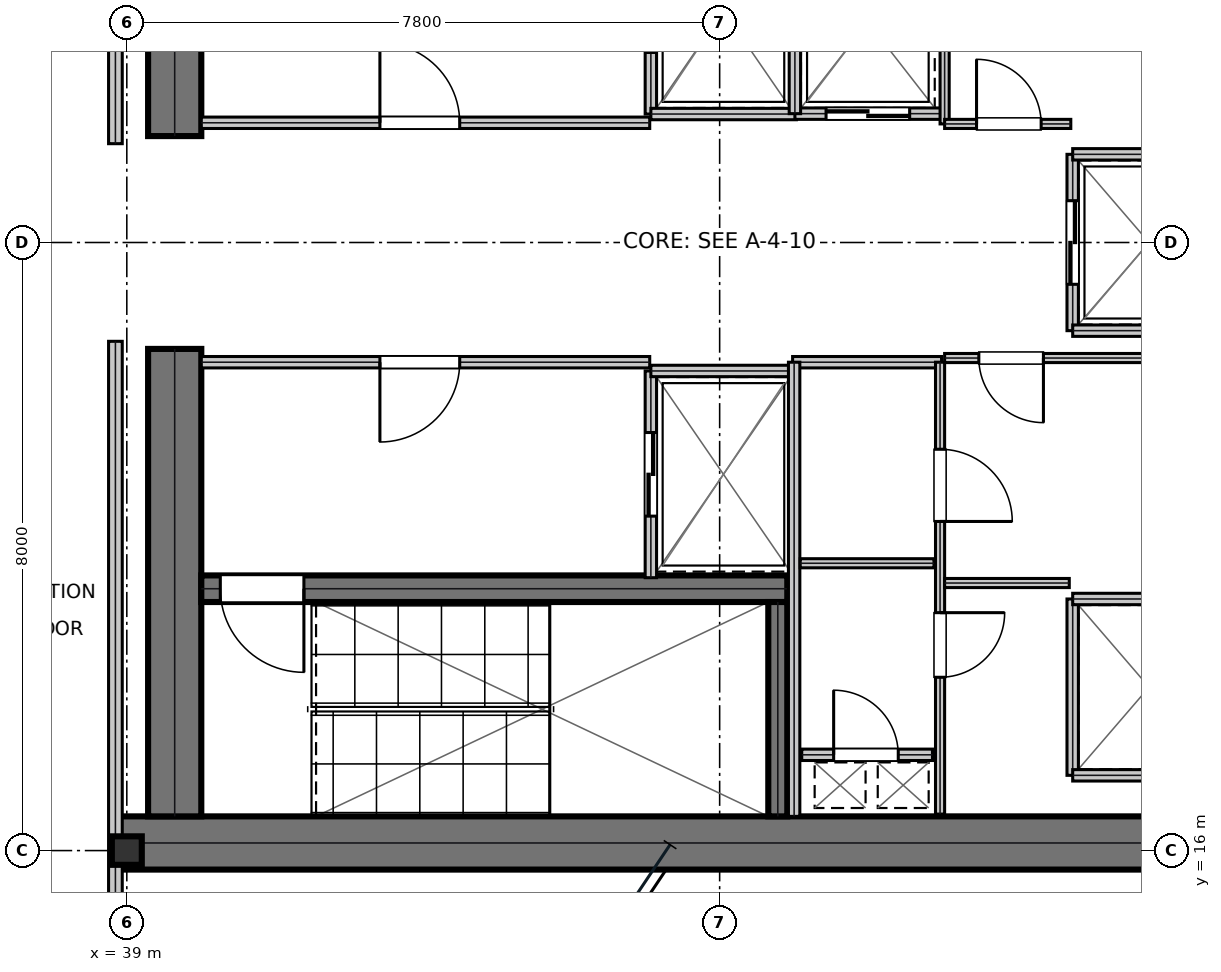
"""IFC4 building model, lengths in metres.
Left out: names, types, materials, properties, quantities, classifications, styles, units other than length and angle.
Written with IfcOpenShell. Run it as: python <this file> out.ifc"""

import sys

from ifc_helpers import new_model, si_unit, direction, frame, frame_2d, origin, origin_2d, place, context, subcontext, project, spatial, rectangle, i_section, extrude, element, fill, save


model = new_model("IFC4")
c1 = context("Model", 3, precision=1e-05, world=origin(), true_north=direction((0.0, 1.0)))
c2 = subcontext(c1, "Body", "Model", "MODEL_VIEW")
j1 = project(units=[si_unit("LENGTHUNIT", "METRE"), si_unit("PLANEANGLEUNIT", "RADIAN")], contexts=[c1])
p1 = place(None, origin())
s1 = spatial("IfcSite", under=j1, at=p1, CompositionType="ELEMENT")
p2 = place(p1, origin())
s2 = spatial("IfcBuilding", under=s1, at=p2, CompositionType="ELEMENT")
p3 = place(p2, frame((0.0, 0.0, 204.0)))
s3 = spatial("IfcBuildingStorey", under=s2, at=p3, CompositionType="ELEMENT", Elevation=204.0)
p4 = place(p3, frame((38.8, 16.1, 0.0), z_axis=(0.0, 0.0, 1.0), x_axis=(1.0, 0.0, 0.0)))
e1 = element("IfcWall", 1, at=p4, inside=s3, PredefinedType="SHEAR", context=c2, shape_type="SweptSolid", body=[
    extrude(rectangle(XDim=16.0, YDim=0.7, at=frame_2d((8.0, 0.0))), origin(), (0.0, 0.0, 1.0), 3.79),
])
for number, where, z_axis, x_axis in (
    (2, (39.63, 16.45, 0.0), (0.0, 0.0, 1.0), (0.0, 1.0, 0.0)),
    (3, (39.63, 25.4, 0.0), (0.0, 0.0, 1.0), (0.0, 1.0, 0.0)),
):
    element("IfcWall", number, at=place(p3, frame(where, z_axis=z_axis, x_axis=x_axis)), inside=s3, PredefinedType="SHEAR", context=c2, shape_type="SweptSolid", body=[
        extrude(rectangle(XDim=6.15, YDim=0.7, at=frame_2d((3.075, 0.0))), origin(), (0.0, 0.0, 1.0), 3.79),
    ])
p5 = place(p3, frame((39.98, 19.445, 0.0), z_axis=(0.0, 0.0, 1.0), x_axis=(1.0, 0.0, 0.0)))
e4 = element("IfcWall", 4, at=p5, inside=s3, PredefinedType="SHEAR", context=c2, shape_type="SweptSolid", body=[
    extrude(rectangle(XDim=7.71, YDim=0.35, at=frame_2d((3.855, 0.0))), origin(), (0.0, 0.0, 1.0), 3.79),
])
p6 = place(p5, frame((0.25, 0.0, 0.0)))
e5 = element("IfcOpeningElement", 5, at=p6, cuts=e4, PredefinedType="OPENING", context=c2, shape_type="SweptSolid", body=[
    extrude(rectangle(XDim=1.1, YDim=2.15, at=frame_2d((0.55, 1.075))), frame((0.0, 0.185, 0.0), z_axis=(0.0, -1.0, 0.0), x_axis=(1.0, 0.0, 0.0)), (0.0, 0.0, 1.0), 0.37),
])
p7 = place(p3, frame((47.565, 16.45, 0.0), z_axis=(0.0, 0.0, 1.0), x_axis=(0.0, 1.0, 0.0)))
e6 = element("IfcWall", 6, at=p7, inside=s3, PredefinedType="SHEAR", context=c2, shape_type="SweptSolid", body=[
    extrude(rectangle(XDim=2.82, YDim=0.25, at=frame_2d((1.41, 0.0))), origin(), (0.0, 0.0, 1.0), 3.79),
])
p8 = place(p3, frame((39.0, 16.0, 0.0), z_axis=(0.0, 0.0, 1.0), x_axis=(1.0, 0.0, 0.0)))
e7 = element("IfcColumn", 7, at=p8, inside=s3, PredefinedType="COLUMN", context=c2, shape_type="SweptSolid", body=[
    extrude(i_section(OverallWidth=0.394, OverallDepth=0.375, WebThickness=0.017, FlangeThickness=0.028, at=origin_2d()), origin(), (0.0, 0.0, 1.0), 4.044),
])
p9 = place(p3, frame((39.98, 25.575, 0.0), z_axis=(0.0, 0.0, 1.0), x_axis=(1.0, 0.0, 0.0)))
e8 = element("IfcWall", 8, at=p9, inside=s3, PredefinedType="PARTITIONING", context=c2, shape_type="SweptSolid", body=[
    extrude(rectangle(XDim=5.9, YDim=0.15, at=frame_2d((2.95, 0.0))), origin(), (0.0, 0.0, 1.0), 3.79),
])
p10 = place(p9, frame((2.35, 0.0, 0.0)))
e9 = element("IfcOpeningElement", 9, at=p10, cuts=e8, PredefinedType="OPENING", context=c2, shape_type="SweptSolid", body=[
    extrude(rectangle(XDim=1.05, YDim=2.15, at=frame_2d((0.525, 1.075))), frame((0.0, 0.085, 0.0), z_axis=(0.0, -1.0, 0.0), x_axis=(1.0, 0.0, 0.0)), (0.0, 0.0, 1.0), 0.17),
])
p11 = place(p3, frame((39.98, 22.425, 0.0), z_axis=(0.0, 0.0, 1.0), x_axis=(1.0, 0.0, 0.0)))
e10 = element("IfcWall", 10, at=p11, inside=s3, PredefinedType="PARTITIONING", context=c2, shape_type="SweptSolid", body=[
    extrude(rectangle(XDim=5.9, YDim=0.15, at=frame_2d((2.95, 0.0))), origin(), (0.0, 0.0, 1.0), 3.79),
])
p12 = place(p11, frame((2.35, 0.0, 0.0)))
e11 = element("IfcOpeningElement", 11, at=p12, cuts=e10, PredefinedType="OPENING", context=c2, shape_type="SweptSolid", body=[
    extrude(rectangle(XDim=1.05, YDim=2.15, at=frame_2d((0.525, 1.075))), frame((0.0, 0.085, 0.0), z_axis=(0.0, -1.0, 0.0), x_axis=(1.0, 0.0, 0.0)), (0.0, 0.0, 1.0), 0.17),
])
p13 = place(p3, frame((45.895, 25.69, 0.0), z_axis=(0.0, 0.0, 1.0), x_axis=(0.0, 1.0, 0.0)))
e12 = element("IfcWall", 12, at=p13, inside=s3, PredefinedType="PARTITIONING", context=c2, shape_type="SweptSolid", body=[
    extrude(rectangle(XDim=2.72, YDim=0.15, at=frame_2d((1.36, 0.0))), origin(), (0.0, 0.0, 1.0), 3.79),
])
p14 = place(p13, frame((0.81, 0.0, 0.0)))
e13 = element("IfcOpeningElement", 13, at=p14, cuts=e12, PredefinedType="OPENING", context=c2, shape_type="SweptSolid", body=[
    extrude(rectangle(XDim=1.1, YDim=2.15, at=frame_2d((0.55, 1.075))), frame((0.0, 0.085, 0.0), z_axis=(0.0, -1.0, 0.0), x_axis=(1.0, 0.0, 0.0)), (0.0, 0.0, 1.0), 0.17),
])
p15 = place(p3, frame((45.895, 25.69, 0.0), z_axis=(0.0, 0.0, 1.0), x_axis=(1.0, 0.0, 0.0)))
e14 = element("IfcWall", 14, at=p15, inside=s3, PredefinedType="PARTITIONING", context=c2, shape_type="SweptSolid", body=[
    extrude(rectangle(XDim=1.915, YDim=0.15, at=frame_2d((0.958, 0.0))), origin(), (0.0, 0.0, 1.0), 3.79),
])
p16 = place(p3, frame((45.895, 19.59, 0.0), z_axis=(0.0, 0.0, 1.0), x_axis=(0.0, 1.0, 0.0)))
e15 = element("IfcWall", 15, at=p16, inside=s3, PredefinedType="PARTITIONING", context=c2, shape_type="SweptSolid", body=[
    extrude(rectangle(XDim=2.72, YDim=0.15, at=frame_2d((1.36, 0.0))), origin(), (0.0, 0.0, 1.0), 3.79),
])
p17 = place(p16, frame((0.81, 0.0, 0.0)))
e16 = element("IfcOpeningElement", 16, at=p17, cuts=e15, PredefinedType="OPENING", context=c2, shape_type="SweptSolid", body=[
    extrude(rectangle(XDim=1.1, YDim=2.15, at=frame_2d((0.55, 1.075))), frame((0.0, 0.085, 0.0), z_axis=(0.0, -1.0, 0.0), x_axis=(1.0, 0.0, 0.0)), (0.0, 0.0, 1.0), 0.17),
])
p18 = place(p3, frame((45.895, 22.31, 0.0), z_axis=(0.0, 0.0, 1.0), x_axis=(1.0, 0.0, 0.0)))
e17 = element("IfcWall", 17, at=p18, inside=s3, PredefinedType="PARTITIONING", context=c2, shape_type="SweptSolid", body=[
    extrude(rectangle(XDim=1.915, YDim=0.15, at=frame_2d((0.958, 0.0))), origin(), (0.0, 0.0, 1.0), 3.79),
])
p19 = place(p3, frame((47.79, 25.695, 0.0), z_axis=(0.0, 0.0, 1.0), x_axis=(1.0, 0.0, 0.0)))
e18 = element("IfcWall", 18, at=p19, inside=s3, PredefinedType="PARTITIONING", context=c2, shape_type="SweptSolid", body=[
    extrude(rectangle(XDim=1.92, YDim=0.15, at=frame_2d((0.96, 0.0))), origin(), (0.0, 0.0, 1.0), 3.79),
])
p20 = place(p19, frame((0.41, 0.0, 0.0)))
e19 = element("IfcOpeningElement", 19, at=p20, cuts=e18, PredefinedType="OPENING", context=c2, shape_type="SweptSolid", body=[
    extrude(rectangle(XDim=1.1, YDim=2.15, at=frame_2d((0.55, 1.075))), frame((0.0, 0.085, 0.0), z_axis=(0.0, -1.0, 0.0), x_axis=(1.0, 0.0, 0.0)), (0.0, 0.0, 1.0), 0.17),
])
p21 = place(p3, frame((47.79, 25.695, 0.0), z_axis=(0.0, 0.0, 1.0), x_axis=(0.0, 1.0, 0.0)))
e20 = element("IfcWall", 20, at=p21, inside=s3, PredefinedType="PARTITIONING", context=c2, shape_type="SweptSolid", body=[
    extrude(rectangle(XDim=2.415, YDim=0.15, at=frame_2d((1.208, 0.0))), origin(), (0.0, 0.0, 1.0), 3.79),
])
p22 = place(p3, frame((51.445, 22.84, 0.0), z_axis=(0.0, 0.0, 1.0), x_axis=(0.0, 1.0, 0.0)))
e21 = element("IfcWall", 21, at=p22, inside=s3, PredefinedType="PARTITIONING", context=c2, shape_type="SweptSolid", body=[
    extrude(rectangle(XDim=2.32, YDim=0.15, at=frame_2d((1.16, 0.0))), origin(), (0.0, 0.0, 1.0), 3.79),
])
p23 = place(p22, frame((0.61, 0.0, 0.0)))
e22 = element("IfcOpeningElement", 22, at=p23, cuts=e21, PredefinedType="OPENING", context=c2, shape_type="SweptSolid", body=[
    extrude(rectangle(XDim=1.1, YDim=2.15, at=frame_2d((0.55, 1.075))), frame((0.0, 0.085, 0.0), z_axis=(0.0, -1.0, 0.0), x_axis=(1.0, 0.0, 0.0)), (0.0, 0.0, 1.0), 0.17),
])
for number, where, z_axis, x_axis in (
    (23, (51.445, 22.84, 0.0), (0.0, 0.0, 1.0), (1.0, 0.0, 0.0)),
    (24, (51.445, 25.16, 0.0), (0.0, 0.0, 1.0), (1.0, 0.0, 0.0)),
):
    element("IfcWall", number, at=place(p3, frame(where, z_axis=z_axis, x_axis=x_axis)), inside=s3, PredefinedType="PARTITIONING", context=c2, shape_type="SweptSolid", body=[
        extrude(rectangle(XDim=2.015, YDim=0.15, at=frame_2d((1.007, 0.0))), origin(), (0.0, 0.0, 1.0), 3.79),
    ])
p24 = place(p3, frame((51.445, 16.99, 0.0), z_axis=(0.0, 0.0, 1.0), x_axis=(0.0, 1.0, 0.0)))
e25 = element("IfcWall", 25, at=p24, inside=s3, PredefinedType="PARTITIONING", context=c2, shape_type="SweptSolid", body=[
    extrude(rectangle(XDim=2.32, YDim=0.15, at=frame_2d((1.16, 0.0))), origin(), (0.0, 0.0, 1.0), 3.79),
])
for number, where, z_axis, x_axis in (
    (26, (51.445, 16.99, 0.0), (0.0, 0.0, 1.0), (1.0, 0.0, 0.0)),
    (27, (51.445, 19.31, 0.0), (0.0, 0.0, 1.0), (1.0, 0.0, 0.0)),
):
    element("IfcWall", number, at=place(p3, frame(where, z_axis=z_axis, x_axis=x_axis)), inside=s3, PredefinedType="PARTITIONING", context=c2, shape_type="SweptSolid", body=[
        extrude(rectangle(XDim=2.015, YDim=0.15, at=frame_2d((1.007, 0.0))), origin(), (0.0, 0.0, 1.0), 3.79),
    ])
p25 = place(p3, frame((47.88, 17.26, 0.0), z_axis=(0.0, 0.0, 1.0), x_axis=(1.0, 0.0, 0.0)))
e28 = element("IfcWall", 28, at=p25, inside=s3, PredefinedType="PARTITIONING", context=c2, shape_type="SweptSolid", body=[
    extrude(rectangle(XDim=1.72, YDim=0.15, at=frame_2d((0.86, 0.0))), origin(), (0.0, 0.0, 1.0), 3.79),
])
p26 = place(p25, frame((0.42, 0.0, 0.0)))
e29 = element("IfcOpeningElement", 29, at=p26, cuts=e28, PredefinedType="OPENING", context=c2, shape_type="SweptSolid", body=[
    extrude(rectangle(XDim=0.85, YDim=2.15, at=frame_2d((0.425, 1.075))), frame((0.0, 0.085, 0.0), z_axis=(0.0, -1.0, 0.0), x_axis=(1.0, 0.0, 0.0)), (0.0, 0.0, 1.0), 0.17),
])
p27 = place(p3, frame((47.76, 22.425, 0.0), z_axis=(0.0, 0.0, 1.0), x_axis=(1.0, 0.0, 0.0)))
e30 = element("IfcWall", 30, at=p27, inside=s3, PredefinedType="PARTITIONING", context=c2, shape_type="SweptSolid", body=[
    extrude(rectangle(XDim=1.96, YDim=0.15, at=frame_2d((0.98, 0.0))), origin(), (0.0, 0.0, 1.0), 3.79),
])
p28 = place(p3, frame((47.78, 16.45, 0.0), z_axis=(0.0, 0.0, 1.0), x_axis=(0.0, 1.0, 0.0)))
e31 = element("IfcWall", 31, at=p28, inside=s3, PredefinedType="PARTITIONING", context=c2, shape_type="SweptSolid", body=[
    extrude(rectangle(XDim=5.975, YDim=0.15, at=frame_2d((2.988, 0.0))), origin(), (0.0, 0.0, 1.0), 3.79),
])
p29 = place(p3, frame((47.86, 19.78, 0.0), z_axis=(0.0, 0.0, 1.0), x_axis=(1.0, 0.0, 0.0)))
e32 = element("IfcWall", 32, at=p29, inside=s3, PredefinedType="PARTITIONING", context=c2, shape_type="SweptSolid", body=[
    extrude(rectangle(XDim=1.76, YDim=0.12, at=frame_2d((0.88, 0.0))), origin(), (0.0, 0.0, 1.0), 3.79),
])
p30 = place(p3, frame((49.7, 16.48, 0.0), z_axis=(0.0, 0.0, 1.0), x_axis=(0.0, 1.0, 0.0)))
e33 = element("IfcWall", 33, at=p30, inside=s3, PredefinedType="PARTITIONING", context=c2, shape_type="SweptSolid", body=[
    extrude(rectangle(XDim=5.945, YDim=0.12, at=frame_2d((2.973, 0.0))), origin(), (0.0, 0.0, 1.0), 3.79),
])
p31 = place(p30, frame((1.8, 0.0, 0.0)))
e34 = element("IfcOpeningElement", 34, at=p31, cuts=e33, PredefinedType="OPENING", context=c2, shape_type="SweptSolid", body=[
    extrude(rectangle(XDim=0.85, YDim=2.15, at=frame_2d((0.425, 1.075))), frame((0.0, 0.07, 0.0), z_axis=(0.0, -1.0, 0.0), x_axis=(1.0, 0.0, 0.0)), (0.0, 0.0, 1.0), 0.14),
])
p32 = place(p30, frame((3.85, 0.0, 0.0)))
e35 = element("IfcOpeningElement", 35, at=p32, cuts=e33, PredefinedType="OPENING", context=c2, shape_type="SweptSolid", body=[
    extrude(rectangle(XDim=0.95, YDim=2.15, at=frame_2d((0.475, 1.075))), frame((0.0, 0.07, 0.0), z_axis=(0.0, -1.0, 0.0), x_axis=(1.0, 0.0, 0.0)), (0.0, 0.0, 1.0), 0.14),
])
p33 = place(p3, frame((49.76, 22.48, 0.0), z_axis=(0.0, 0.0, 1.0), x_axis=(1.0, 0.0, 0.0)))
e36 = element("IfcWall", 36, at=p33, inside=s3, PredefinedType="PARTITIONING", context=c2, shape_type="SweptSolid", body=[
    extrude(rectangle(XDim=3.9, YDim=0.12, at=frame_2d((1.95, 0.0))), origin(), (0.0, 0.0, 1.0), 3.79),
])
p34 = place(p33, frame((0.45, 0.0, 0.0)))
e37 = element("IfcOpeningElement", 37, at=p34, cuts=e36, PredefinedType="OPENING", context=c2, shape_type="SweptSolid", body=[
    extrude(rectangle(XDim=0.85, YDim=2.15, at=frame_2d((0.425, 1.075))), frame((0.0, 0.07, 0.0), z_axis=(0.0, -1.0, 0.0), x_axis=(1.0, 0.0, 0.0)), (0.0, 0.0, 1.0), 0.14),
])
p35 = place(p3, frame((49.76, 19.52, 0.0), z_axis=(0.0, 0.0, 1.0), x_axis=(1.0, 0.0, 0.0)))
e38 = element("IfcWall", 38, at=p35, inside=s3, PredefinedType="PARTITIONING", context=c2, shape_type="SweptSolid", body=[
    extrude(rectangle(XDim=1.64, YDim=0.12, at=frame_2d((0.82, 0.0))), origin(), (0.0, 0.0, 1.0), 3.79),
])
p36 = place(p3, frame((49.76, 25.56, 0.0), z_axis=(0.0, 0.0, 1.0), x_axis=(0.0, 1.0, 0.0)))
e39 = element("IfcWall", 39, at=p36, inside=s3, PredefinedType="PARTITIONING", context=c2, shape_type="SweptSolid", body=[
    extrude(rectangle(XDim=2.66, YDim=0.12, at=frame_2d((1.33, 0.0))), origin(), (0.0, 0.0, 1.0), 3.79),
])
p37 = place(p3, frame((49.76, 25.56, 0.0), z_axis=(0.0, 0.0, 1.0), x_axis=(1.0, 0.0, 0.0)))
e40 = element("IfcWall", 40, at=p37, inside=s3, PredefinedType="PARTITIONING", context=c2, shape_type="SweptSolid", body=[
    extrude(rectangle(XDim=1.66, YDim=0.12, at=frame_2d((0.83, 0.0))), origin(), (0.0, 0.0, 1.0), 3.79),
])
p38 = place(p37, frame((0.42, 0.0, 0.0)))
e41 = element("IfcOpeningElement", 41, at=p38, cuts=e40, PredefinedType="OPENING", context=c2, shape_type="SweptSolid", body=[
    extrude(rectangle(XDim=0.85, YDim=2.15, at=frame_2d((0.425, 1.075))), frame((0.0, 0.07, 0.0), z_axis=(0.0, -1.0, 0.0), x_axis=(1.0, 0.0, 0.0)), (0.0, 0.0, 1.0), 0.14),
])
p39 = place(p3, frame((38.85, 14.5, 0.0), z_axis=(0.0, 0.0, 1.0), x_axis=(0.0, 1.0, 0.0)))
e42 = element("IfcWall", 42, at=p39, inside=s3, PredefinedType="SOLIDWALL", context=c2, shape_type="SweptSolid", body=[
    extrude(rectangle(XDim=8.2, YDim=0.18, at=frame_2d((4.1, 0.0))), origin(), (0.0, 0.0, 1.0), 3.241),
])
p40 = place(p3, frame((38.85, 25.3, 0.0), z_axis=(0.0, 0.0, 1.0), x_axis=(0.0, 1.0, 0.0)))
e43 = element("IfcWall", 43, at=p40, inside=s3, PredefinedType="SOLIDWALL", context=c2, shape_type="SweptSolid", body=[
    extrude(rectangle(XDim=8.198, YDim=0.18, at=frame_2d((4.099, 0.0))), origin(), (0.0, 0.0, 1.0), 3.241),
])
p41 = place(p10, origin())
e44 = element("IfcDoor", 44, at=p41, inside=s3, OperationType="SINGLE_SWING_LEFT", PredefinedType="DOOR", context=c2, shape_type="SweptSolid", body=[
    extrude(rectangle(XDim=1.05, YDim=2.15, at=frame_2d((0.525, 1.075))), frame((0.0, 0.025, 0.0), z_axis=(0.0, -1.0, 0.0), x_axis=(1.0, 0.0, 0.0)), (0.0, 0.0, 1.0), 0.05),
])
fill(e9, e44)
p42 = place(p12, frame((1.05, 0.0, 0.0), z_axis=(0.0, 0.0, 1.0), x_axis=(-1.0, 0.0, 0.0)))
e45 = element("IfcDoor", 45, at=p42, inside=s3, OperationType="SINGLE_SWING_RIGHT", PredefinedType="DOOR", context=c2, shape_type="SweptSolid", body=[
    extrude(rectangle(XDim=1.05, YDim=2.15, at=frame_2d((0.525, 1.075))), frame((0.0, 0.025, 0.0), z_axis=(0.0, -1.0, 0.0), x_axis=(1.0, 0.0, 0.0)), (0.0, 0.0, 1.0), 0.05),
])
fill(e11, e45)
p43 = place(p17, frame((1.1, 0.0, 0.0), z_axis=(0.0, 0.0, 1.0), x_axis=(-1.0, 0.0, 0.0)))
e46 = element("IfcDoor", 46, at=p43, inside=s3, OperationType="DOUBLE_DOOR_SLIDING", PredefinedType="DOOR", context=c2, shape_type="SweptSolid", body=[
    extrude(rectangle(XDim=1.1, YDim=2.15, at=frame_2d((0.55, 1.075))), frame((0.0, 0.025, 0.0), z_axis=(0.0, -1.0, 0.0), x_axis=(1.0, 0.0, 0.0)), (0.0, 0.0, 1.0), 0.05),
])
fill(e16, e46)
p44 = place(p20, frame((1.1, 0.0, 0.0), z_axis=(0.0, 0.0, 1.0), x_axis=(-1.0, 0.0, 0.0)))
e47 = element("IfcDoor", 47, at=p44, inside=s3, OperationType="DOUBLE_DOOR_SLIDING", PredefinedType="DOOR", context=c2, shape_type="SweptSolid", body=[
    extrude(rectangle(XDim=1.1, YDim=2.15, at=frame_2d((0.55, 1.075))), frame((0.0, 0.025, 0.0), z_axis=(0.0, -1.0, 0.0), x_axis=(1.0, 0.0, 0.0)), (0.0, 0.0, 1.0), 0.05),
])
fill(e19, e47)
p45 = place(p23, frame((1.1, 0.0, 0.0), z_axis=(0.0, 0.0, 1.0), x_axis=(-1.0, 0.0, 0.0)))
e48 = element("IfcDoor", 48, at=p45, inside=s3, OperationType="DOUBLE_DOOR_SLIDING", PredefinedType="DOOR", context=c2, shape_type="SweptSolid", body=[
    extrude(rectangle(XDim=1.1, YDim=2.15, at=frame_2d((0.55, 1.075))), frame((0.0, 0.025, 0.0), z_axis=(0.0, -1.0, 0.0), x_axis=(1.0, 0.0, 0.0)), (0.0, 0.0, 1.0), 0.05),
])
fill(e22, e48)
p46 = place(p26, origin())
e49 = element("IfcDoor", 49, at=p46, inside=s3, OperationType="SINGLE_SWING_LEFT", PredefinedType="TRAPDOOR", context=c2, shape_type="SweptSolid", body=[
    extrude(rectangle(XDim=0.85, YDim=2.15, at=frame_2d((0.425, 1.075))), frame((0.0, 0.025, 0.0), z_axis=(0.0, -1.0, 0.0), x_axis=(1.0, 0.0, 0.0)), (0.0, 0.0, 1.0), 0.05),
])
fill(e29, e49)
p47 = place(p31, frame((0.85, 0.0, 0.0), z_axis=(0.0, 0.0, 1.0), x_axis=(-1.0, 0.0, 0.0)))
e50 = element("IfcDoor", 50, at=p47, inside=s3, OperationType="SINGLE_SWING_LEFT", PredefinedType="DOOR", context=c2, shape_type="SweptSolid", body=[
    extrude(rectangle(XDim=0.85, YDim=2.15, at=frame_2d((0.425, 1.075))), frame((0.0, 0.025, 0.0), z_axis=(0.0, -1.0, 0.0), x_axis=(1.0, 0.0, 0.0)), (0.0, 0.0, 1.0), 0.05),
])
fill(e34, e50)
p48 = place(p32, frame((0.95, 0.0, 0.0), z_axis=(0.0, 0.0, 1.0), x_axis=(-1.0, 0.0, 0.0)))
e51 = element("IfcDoor", 51, at=p48, inside=s3, OperationType="SINGLE_SWING_RIGHT", PredefinedType="DOOR", context=c2, shape_type="SweptSolid", body=[
    extrude(rectangle(XDim=0.95, YDim=2.15, at=frame_2d((0.475, 1.075))), frame((0.0, 0.025, 0.0), z_axis=(0.0, -1.0, 0.0), x_axis=(1.0, 0.0, 0.0)), (0.0, 0.0, 1.0), 0.05),
])
fill(e35, e51)
p49 = place(p34, frame((0.85, 0.0, 0.0), z_axis=(0.0, 0.0, 1.0), x_axis=(-1.0, 0.0, 0.0)))
e52 = element("IfcDoor", 52, at=p49, inside=s3, OperationType="SINGLE_SWING_LEFT", PredefinedType="DOOR", context=c2, shape_type="SweptSolid", body=[
    extrude(rectangle(XDim=0.85, YDim=2.15, at=frame_2d((0.425, 1.075))), frame((0.0, 0.025, 0.0), z_axis=(0.0, -1.0, 0.0), x_axis=(1.0, 0.0, 0.0)), (0.0, 0.0, 1.0), 0.05),
])
fill(e37, e52)
p50 = place(p38, origin())
e53 = element("IfcDoor", 53, at=p50, inside=s3, OperationType="SINGLE_SWING_LEFT", PredefinedType="DOOR", context=c2, shape_type="SweptSolid", body=[
    extrude(rectangle(XDim=0.85, YDim=2.15, at=frame_2d((0.425, 1.075))), frame((0.0, 0.025, 0.0), z_axis=(0.0, -1.0, 0.0), x_axis=(1.0, 0.0, 0.0)), (0.0, 0.0, 1.0), 0.05),
])
fill(e41, e53)
p51 = place(p6, frame((1.1, 0.0, 0.0), z_axis=(0.0, 0.0, 1.0), x_axis=(-1.0, 0.0, 0.0)))
e54 = element("IfcDoor", 54, at=p51, inside=s3, OperationType="SINGLE_SWING_LEFT", PredefinedType="DOOR", context=c2, shape_type="SweptSolid", body=[
    extrude(rectangle(XDim=1.1, YDim=2.15, at=frame_2d((0.55, 1.075))), frame((0.0, 0.025, 0.0), z_axis=(0.0, -1.0, 0.0), x_axis=(1.0, 0.0, 0.0)), (0.0, 0.0, 1.0), 0.05),
])
fill(e5, e54)
save(model, sys.argv[1])
